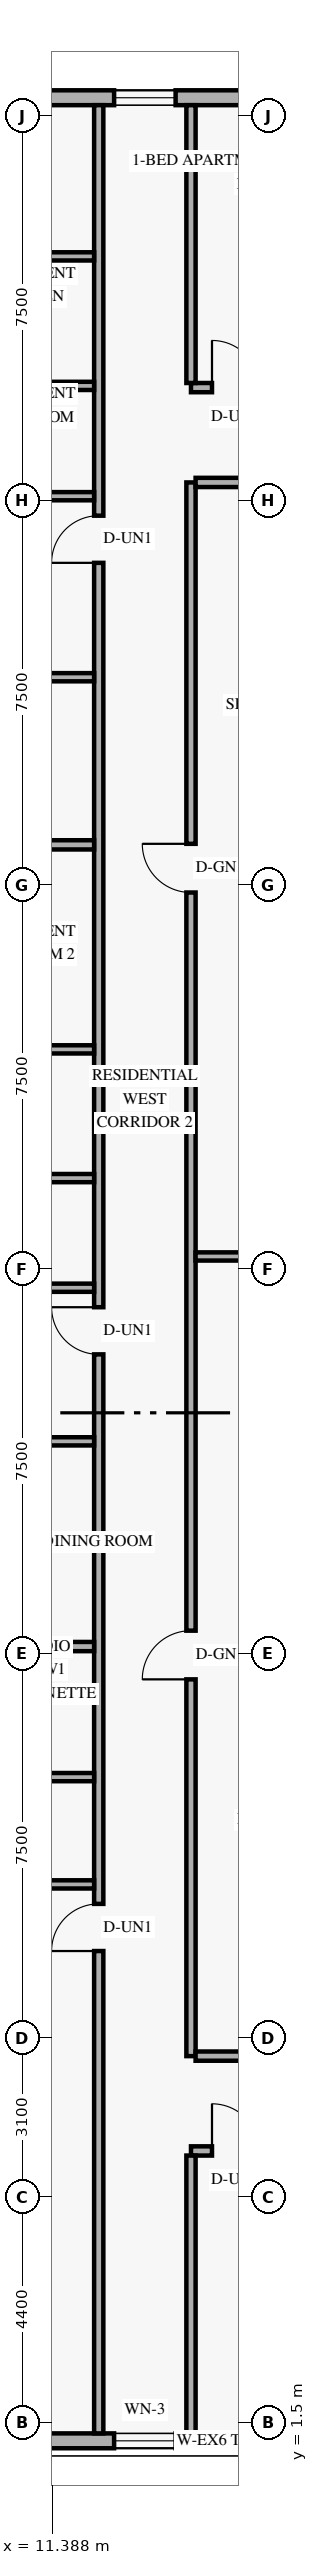
"""IFC4 building model, lengths in metres.
Left out: names, types, materials, properties, quantities, classifications, styles, units other than length and angle.
Written with IfcOpenShell. Run it as: python <this file> out.ifc"""

import sys

from ifc_helpers import new_model, si_unit, direction, frame, frame_2d, origin, place, context, subcontext, project, spatial, rectangle, extrude, element, fill, save


model = new_model("IFC4")
c1 = context("Model", 3, precision=1e-05, world=origin(), true_north=direction((0.0, 1.0)))
c2 = subcontext(c1, "Body", "Model", "MODEL_VIEW")
j1 = project(units=[si_unit("LENGTHUNIT", "METRE"), si_unit("PLANEANGLEUNIT", "RADIAN")], contexts=[c1])
p1 = place(None, origin())
s1 = spatial("IfcSite", under=j1, at=p1, CompositionType="ELEMENT")
p2 = place(p1, origin())
s2 = spatial("IfcBuilding", under=s1, at=p2, CompositionType="ELEMENT")
p3 = place(p2, frame((0.0, 0.0, 31.2)))
s3 = spatial("IfcBuildingStorey", under=s2, at=p3, CompositionType="ELEMENT", Elevation=31.2)
p4 = place(p3, frame((5.42, 1.145, 0.0), z_axis=(0.0, 0.0, 1.0), x_axis=(1.0, 0.0, 0.0)))
e1 = element("IfcWall", 1, at=p4, inside=s3, PredefinedType="SOLIDWALL", context=c2, shape_type="SweptSolid", body=[
    extrude(rectangle(XDim=19.58, YDim=0.29, at=frame_2d((9.79, 0.0))), origin(), (0.0, 0.0, 1.0), 3.36),
])
p5 = place(p4, frame((2.69, 0.0, 0.85)))
e2 = element("IfcOpeningElement", 2, at=p5, cuts=e1, PredefinedType="OPENING", context=c2, shape_type="SweptSolid", body=[
    extrude(rectangle(XDim=1.5, YDim=1.55, at=frame_2d((0.75, 0.775))), frame((0.0, 0.155, 0.0), z_axis=(0.0, -1.0, 0.0), x_axis=(1.0, 0.0, 0.0)), (0.0, 0.0, 1.0), 0.31),
])
p6 = place(p4, frame((7.18, 0.0, 0.85)))
e3 = element("IfcOpeningElement", 3, at=p6, cuts=e1, PredefinedType="OPENING", context=c2, shape_type="SweptSolid", body=[
    extrude(rectangle(XDim=1.2, YDim=1.5, at=frame_2d((0.6, 0.75))), frame((0.0, 0.155, 0.0), z_axis=(0.0, -1.0, 0.0), x_axis=(1.0, 0.0, 0.0)), (0.0, 0.0, 1.0), 0.31),
])
p7 = place(p4, frame((11.095, 0.0, 0.85)))
e4 = element("IfcOpeningElement", 4, at=p7, cuts=e1, PredefinedType="OPENING", context=c2, shape_type="SweptSolid", body=[
    extrude(rectangle(XDim=1.5, YDim=1.55, at=frame_2d((0.75, 0.775))), frame((0.0, 0.155, 0.0), z_axis=(0.0, -1.0, 0.0), x_axis=(1.0, 0.0, 0.0)), (0.0, 0.0, 1.0), 0.31),
])
p8 = place(p4, frame((16.33, 0.0, 0.85)))
e5 = element("IfcOpeningElement", 5, at=p8, cuts=e1, PredefinedType="OPENING", context=c2, shape_type="SweptSolid", body=[
    extrude(rectangle(XDim=1.5, YDim=1.55, at=frame_2d((0.75, 0.775))), frame((0.0, 0.155, 0.0), z_axis=(0.0, -1.0, 0.0), x_axis=(1.0, 0.0, 0.0)), (0.0, 0.0, 1.0), 0.31),
])
p9 = place(p3, frame((44.98, 46.855, 0.0), z_axis=(0.0, 0.0, 1.0), x_axis=(-1.0, 0.0, 0.0)))
e6 = element("IfcWall", 6, at=p9, inside=s3, PredefinedType="SOLIDWALL", context=c2, shape_type="SweptSolid", body=[
    extrude(rectangle(XDim=39.56, YDim=0.29, at=frame_2d((19.78, 0.0))), origin(), (0.0, 0.0, 1.0), 3.36),
])
p10 = place(p9, frame((35.22, 0.0, 0.85)))
e7 = element("IfcOpeningElement", 7, at=p10, cuts=e6, PredefinedType="OPENING", context=c2, shape_type="SweptSolid", body=[
    extrude(rectangle(XDim=1.8, YDim=1.6, at=frame_2d((0.9, 0.8))), frame((0.0, 0.155, 0.0), z_axis=(0.0, -1.0, 0.0), x_axis=(1.0, 0.0, 0.0)), (0.0, 0.0, 1.0), 0.31),
])
p11 = place(p9, frame((31.18, 0.0, 0.85)))
e8 = element("IfcOpeningElement", 8, at=p11, cuts=e6, PredefinedType="OPENING", context=c2, shape_type="SweptSolid", body=[
    extrude(rectangle(XDim=1.2, YDim=1.5, at=frame_2d((0.6, 0.75))), frame((0.0, 0.155, 0.0), z_axis=(0.0, -1.0, 0.0), x_axis=(1.0, 0.0, 0.0)), (0.0, 0.0, 1.0), 0.31),
])
p12 = place(p9, frame((26.625, 0.0, 0.85)))
e9 = element("IfcOpeningElement", 9, at=p12, cuts=e6, PredefinedType="OPENING", context=c2, shape_type="SweptSolid", body=[
    extrude(rectangle(XDim=1.8, YDim=1.6, at=frame_2d((0.9, 0.8))), frame((0.0, 0.155, 0.0), z_axis=(0.0, -1.0, 0.0), x_axis=(1.0, 0.0, 0.0)), (0.0, 0.0, 1.0), 0.31),
])
p13 = place(p9, frame((21.2, 0.0, 0.85)))
e10 = element("IfcOpeningElement", 10, at=p13, cuts=e6, PredefinedType="OPENING", context=c2, shape_type="SweptSolid", body=[
    extrude(rectangle(XDim=1.8, YDim=1.6, at=frame_2d((0.9, 0.8))), frame((0.0, 0.155, 0.0), z_axis=(0.0, -1.0, 0.0), x_axis=(1.0, 0.0, 0.0)), (0.0, 0.0, 1.0), 0.31),
])
p14 = place(p9, frame((15.965, 0.0, 0.85)))
e11 = element("IfcOpeningElement", 11, at=p14, cuts=e6, PredefinedType="OPENING", context=c2, shape_type="SweptSolid", body=[
    extrude(rectangle(XDim=1.8, YDim=1.6, at=frame_2d((0.9, 0.8))), frame((0.0, 0.155, 0.0), z_axis=(0.0, -1.0, 0.0), x_axis=(1.0, 0.0, 0.0)), (0.0, 0.0, 1.0), 0.31),
])
p15 = place(p9, frame((10.73, 0.0, 0.85)))
e12 = element("IfcOpeningElement", 12, at=p15, cuts=e6, PredefinedType="OPENING", context=c2, shape_type="SweptSolid", body=[
    extrude(rectangle(XDim=1.8, YDim=1.6, at=frame_2d((0.9, 0.8))), frame((0.0, 0.155, 0.0), z_axis=(0.0, -1.0, 0.0), x_axis=(1.0, 0.0, 0.0)), (0.0, 0.0, 1.0), 0.31),
])
p16 = place(p9, frame((7.895, 0.0, 0.85)))
e13 = element("IfcOpeningElement", 13, at=p16, cuts=e6, PredefinedType="OPENING", context=c2, shape_type="SweptSolid", body=[
    extrude(rectangle(XDim=1.2, YDim=1.5, at=frame_2d((0.6, 0.75))), frame((0.0, 0.155, 0.0), z_axis=(0.0, -1.0, 0.0), x_axis=(1.0, 0.0, 0.0)), (0.0, 0.0, 1.0), 0.31),
])
p17 = place(p9, frame((2.815, 0.0, 0.85)))
e14 = element("IfcOpeningElement", 14, at=p17, cuts=e6, PredefinedType="OPENING", context=c2, shape_type="SweptSolid", body=[
    extrude(rectangle(XDim=1.8, YDim=1.6, at=frame_2d((0.9, 0.8))), frame((0.0, 0.155, 0.0), z_axis=(0.0, -1.0, 0.0), x_axis=(1.0, 0.0, 0.0)), (0.0, 0.0, 1.0), 0.31),
])
p18 = place(p3, frame((14.1, 6.8, 0.0), z_axis=(0.0, 0.0, 1.0), x_axis=(1.0, 0.0, 0.0)))
e15 = element("IfcWall", 15, at=p18, inside=s3, PredefinedType="STANDARD", context=c2, shape_type="SweptSolid", body=[
    extrude(rectangle(XDim=21.32, YDim=0.18, at=frame_2d((10.66, 0.0))), origin(), (0.0, 0.0, 1.0), 2.649),
])
p19 = place(p18, frame((0.41, 0.0, 0.0)))
e16 = element("IfcOpeningElement", 16, at=p19, cuts=e15, PredefinedType="OPENING", context=c2, shape_type="SweptSolid", body=[
    extrude(rectangle(XDim=0.92, YDim=2.15, at=frame_2d((0.46, 1.075))), frame((0.0, 0.1, 0.0), z_axis=(0.0, -1.0, 0.0), x_axis=(1.0, 0.0, 0.0)), (0.0, 0.0, 1.0), 0.2),
])
p20 = place(p18, frame((10.88, 0.0, 0.0)))
e17 = element("IfcOpeningElement", 17, at=p20, cuts=e15, PredefinedType="OPENING", context=c2, shape_type="SweptSolid", body=[
    extrude(rectangle(XDim=0.92, YDim=2.15, at=frame_2d((0.46, 1.075))), frame((0.0, 0.1, 0.0), z_axis=(0.0, -1.0, 0.0), x_axis=(1.0, 0.0, 0.0)), (0.0, 0.0, 1.0), 0.2),
])
p21 = place(p3, frame((14.1, 41.2, 0.0), z_axis=(0.0, 0.0, 1.0), x_axis=(1.0, 0.0, 0.0)))
e18 = element("IfcWall", 18, at=p21, inside=s3, PredefinedType="STANDARD", context=c2, shape_type="SweptSolid", body=[
    extrude(rectangle(XDim=21.32, YDim=0.18, at=frame_2d((10.66, 0.0))), origin(), (0.0, 0.0, 1.0), 2.649),
])
p22 = place(p21, frame((0.41, 0.0, 0.0)))
e19 = element("IfcOpeningElement", 19, at=p22, cuts=e18, PredefinedType="OPENING", context=c2, shape_type="SweptSolid", body=[
    extrude(rectangle(XDim=0.92, YDim=2.15, at=frame_2d((0.46, 1.075))), frame((0.0, 0.1, 0.0), z_axis=(0.0, -1.0, 0.0), x_axis=(1.0, 0.0, 0.0)), (0.0, 0.0, 1.0), 0.2),
])
p23 = place(p21, frame((11.26, 0.0, 0.0)))
e20 = element("IfcOpeningElement", 20, at=p23, cuts=e18, PredefinedType="OPENING", context=c2, shape_type="SweptSolid", body=[
    extrude(rectangle(XDim=0.92, YDim=2.15, at=frame_2d((0.46, 1.075))), frame((0.0, 0.1, 0.0), z_axis=(0.0, -1.0, 0.0), x_axis=(1.0, 0.0, 0.0)), (0.0, 0.0, 1.0), 0.2),
])
p24 = place(p3, frame((12.3, 1.29, 0.0), z_axis=(0.0, 0.0, 1.0), x_axis=(0.0, 1.0, 0.0)))
e21 = element("IfcWall", 21, at=p24, inside=s3, PredefinedType="STANDARD", context=c2, shape_type="SweptSolid", body=[
    extrude(rectangle(XDim=45.42, YDim=0.18, at=frame_2d((22.71, 0.0))), origin(), (0.0, 0.0, 1.0), 2.649),
])
p25 = place(p24, frame((9.41, 0.0, 0.0)))
e22 = element("IfcOpeningElement", 22, at=p25, cuts=e21, PredefinedType="OPENING", context=c2, shape_type="SweptSolid", body=[
    extrude(rectangle(XDim=0.92, YDim=2.15, at=frame_2d((0.46, 1.075))), frame((0.0, 0.1, 0.0), z_axis=(0.0, -1.0, 0.0), x_axis=(1.0, 0.0, 0.0)), (0.0, 0.0, 1.0), 0.2),
])
p26 = place(p24, frame((21.05, 0.0, 0.0)))
e23 = element("IfcOpeningElement", 23, at=p26, cuts=e21, PredefinedType="OPENING", context=c2, shape_type="SweptSolid", body=[
    extrude(rectangle(XDim=0.92, YDim=2.15, at=frame_2d((0.46, 1.075))), frame((0.0, 0.1, 0.0), z_axis=(0.0, -1.0, 0.0), x_axis=(1.0, 0.0, 0.0)), (0.0, 0.0, 1.0), 0.2),
])
p27 = place(p24, frame((36.491, 0.0, 0.0)))
e24 = element("IfcOpeningElement", 24, at=p27, cuts=e21, PredefinedType="OPENING", context=c2, shape_type="SweptSolid", body=[
    extrude(rectangle(XDim=0.92, YDim=2.15, at=frame_2d((0.46, 1.075))), frame((0.0, 0.1, 0.0), z_axis=(0.0, -1.0, 0.0), x_axis=(1.0, 0.0, 0.0)), (0.0, 0.0, 1.0), 0.2),
])
p28 = place(p3, frame((14.1, 8.65, 0.0), z_axis=(0.0, 0.0, 1.0), x_axis=(0.0, 1.0, 0.0)))
e25 = element("IfcWall", 25, at=p28, inside=s3, PredefinedType="STANDARD", context=c2, shape_type="SweptSolid", body=[
    extrude(rectangle(XDim=30.7, YDim=0.18, at=frame_2d((15.35, 0.0))), origin(), (0.0, 0.0, 1.0), 2.649),
])
p29 = place(p28, frame((7.35, 0.0, 0.0)))
e26 = element("IfcOpeningElement", 26, at=p29, cuts=e25, PredefinedType="OPENING", context=c2, shape_type="SweptSolid", body=[
    extrude(rectangle(XDim=0.95, YDim=2.15, at=frame_2d((0.475, 1.075))), frame((0.0, 0.1, 0.0), z_axis=(0.0, -1.0, 0.0), x_axis=(1.0, 0.0, 0.0)), (0.0, 0.0, 1.0), 0.2),
])
p30 = place(p28, frame((22.7, 0.0, 0.0)))
e27 = element("IfcOpeningElement", 27, at=p30, cuts=e25, PredefinedType="OPENING", context=c2, shape_type="SweptSolid", body=[
    extrude(rectangle(XDim=0.95, YDim=2.15, at=frame_2d((0.475, 1.075))), frame((0.0, 0.1, 0.0), z_axis=(0.0, -1.0, 0.0), x_axis=(1.0, 0.0, 0.0)), (0.0, 0.0, 1.0), 0.2),
])
for number, where, z_axis, x_axis in (
    (28, (14.19, 8.65, 0.0), (0.0, 0.0, 1.0), (1.0, 0.0, 0.0)),
    (29, (14.19, 39.35, 0.0), (0.0, 0.0, 1.0), (1.0, 0.0, 0.0)),
):
    element("IfcWall", number, at=place(p3, frame(where, z_axis=z_axis, x_axis=x_axis)), inside=s3, PredefinedType="STANDARD", context=c2, shape_type="SweptSolid", body=[
        extrude(rectangle(XDim=7.37, YDim=0.18, at=frame_2d((3.685, 0.0))), origin(), (0.0, 0.0, 1.0), 2.649),
    ])
for number, where, z_axis, x_axis in (
    (30, (14.1, 1.29, 0.0), (0.0, 0.0, 1.0), (0.0, 1.0, 0.0)),
    (31, (14.1, 41.29, 0.0), (0.0, 0.0, 1.0), (0.0, 1.0, 0.0)),
):
    element("IfcWall", number, at=place(p3, frame(where, z_axis=z_axis, x_axis=x_axis)), inside=s3, PredefinedType="PARTITIONING", context=c2, shape_type="SweptSolid", body=[
        extrude(rectangle(XDim=5.42, YDim=0.18, at=frame_2d((2.71, 0.0))), origin(), (0.0, 0.0, 1.0), 2.809),
    ])
p31 = place(p3, frame((9.376, 12.0, 0.0), z_axis=(0.0, 0.0, 1.0), x_axis=(1.0, 0.0, 0.0)))
e32 = element("IfcWall", 32, at=p31, inside=s3, PredefinedType="PLUMBINGWALL", context=c2, shape_type="SweptSolid", body=[
    extrude(rectangle(XDim=2.834, YDim=0.16, at=frame_2d((1.417, 0.0))), origin(), (0.0, 0.0, 1.0), 2.649),
])
p32 = place(p3, frame((9.536, 14.093, 0.0), z_axis=(0.0, 0.0, 1.0), x_axis=(1.0, 0.0, 0.0)))
e33 = element("IfcWall", 33, at=p32, inside=s3, PredefinedType="PLUMBINGWALL", context=c2, shape_type="SweptSolid", body=[
    extrude(rectangle(XDim=2.674, YDim=0.16, at=frame_2d((1.337, 0.0))), origin(), (0.0, 0.0, 1.0), 2.649),
])
p33 = place(p3, frame((2.09, 16.64, 0.0), z_axis=(0.0, 0.0, 1.0), x_axis=(1.0, 0.0, 0.0)))
e34 = element("IfcWall", 34, at=p33, inside=s3, PredefinedType="PARTITIONING", context=c2, shape_type="SweptSolid", body=[
    extrude(rectangle(XDim=10.12, YDim=0.18, at=frame_2d((5.06, 0.0))), origin(), (0.0, 0.0, 1.0), 2.649),
])
p34 = place(p3, frame((2.09, 28.29, 0.0), z_axis=(0.0, 0.0, 1.0), x_axis=(1.0, 0.0, 0.0)))
e35 = element("IfcWall", 35, at=p34, inside=s3, PredefinedType="PARTITIONING", context=c2, shape_type="SweptSolid", body=[
    extrude(rectangle(XDim=10.12, YDim=0.16, at=frame_2d((5.06, 0.0))), origin(), (0.0, 0.0, 1.0), 2.649),
])
p35 = place(p34, frame((2.145, 0.0, 0.0)))
e36 = element("IfcOpeningElement", 36, at=p35, cuts=e35, PredefinedType="OPENING", context=c2, shape_type="SweptSolid", body=[
    extrude(rectangle(XDim=0.88, YDim=2.14, at=frame_2d((0.44, 1.07))), frame((0.0, 0.09, 0.0), z_axis=(0.0, -1.0, 0.0), x_axis=(1.0, 0.0, 0.0)), (0.0, 0.0, 1.0), 0.18),
])
p36 = place(p34, frame((6.035, 0.0, 0.0)))
e37 = element("IfcOpeningElement", 37, at=p36, cuts=e35, PredefinedType="OPENING", context=c2, shape_type="SweptSolid", body=[
    extrude(rectangle(XDim=0.88, YDim=2.14, at=frame_2d((0.44, 1.07))), frame((0.0, 0.09, 0.0), z_axis=(0.0, -1.0, 0.0), x_axis=(1.0, 0.0, 0.0)), (0.0, 0.0, 1.0), 0.18),
])
p37 = place(p3, frame((9.65, 23.64, 0.0), z_axis=(0.0, 0.0, 1.0), x_axis=(1.0, 0.0, 0.0)))
e38 = element("IfcWall", 38, at=p37, inside=s3, PredefinedType="PLUMBINGWALL", context=c2, shape_type="SweptSolid", body=[
    extrude(rectangle(XDim=2.56, YDim=0.16, at=frame_2d((1.28, 0.0))), origin(), (0.0, 0.0, 1.0), 2.649),
])
p38 = place(p3, frame((9.81, 25.779, 0.0), z_axis=(0.0, 0.0, 1.0), x_axis=(1.0, 0.0, 0.0)))
e39 = element("IfcWall", 39, at=p38, inside=s3, PredefinedType="PLUMBINGWALL", context=c2, shape_type="SweptSolid", body=[
    extrude(rectangle(XDim=2.4, YDim=0.16, at=frame_2d((1.2, 0.0))), origin(), (0.0, 0.0, 1.0), 2.649),
])
p39 = place(p3, frame((2.09, 20.643, 0.0), z_axis=(0.0, 0.0, 1.0), x_axis=(1.0, 0.0, 0.0)))
e40 = element("IfcWall", 40, at=p39, inside=s3, PredefinedType="PARTITIONING", context=c2, shape_type="SweptSolid", body=[
    extrude(rectangle(XDim=10.12, YDim=0.16, at=frame_2d((5.06, 0.0))), origin(), (0.0, 0.0, 1.0), 2.649),
])
p40 = place(p39, frame((4.51, 0.0, 0.0)))
e41 = element("IfcOpeningElement", 41, at=p40, cuts=e40, PredefinedType="OPENING", context=c2, shape_type="SweptSolid", body=[
    extrude(rectangle(XDim=0.95, YDim=2.15, at=frame_2d((0.475, 1.075))), frame((0.0, 0.09, 0.0), z_axis=(0.0, -1.0, 0.0), x_axis=(1.0, 0.0, 0.0)), (0.0, 0.0, 1.0), 0.18),
])
p41 = place(p3, frame((2.09, 32.28, 0.0), z_axis=(0.0, 0.0, 1.0), x_axis=(1.0, 0.0, 0.0)))
e42 = element("IfcWall", 42, at=p41, inside=s3, PredefinedType="PARTITIONING", context=c2, shape_type="SweptSolid", body=[
    extrude(rectangle(XDim=10.12, YDim=0.18, at=frame_2d((5.06, 0.0))), origin(), (0.0, 0.0, 1.0), 2.649),
])
p42 = place(p3, frame((2.162, 43.76, 0.0), z_axis=(0.0, 0.0, 1.0), x_axis=(1.0, 0.0, 0.0)))
e43 = element("IfcWall", 43, at=p42, inside=s3, PredefinedType="PARTITIONING", context=c2, shape_type="SweptSolid", body=[
    extrude(rectangle(XDim=10.048, YDim=0.16, at=frame_2d((5.024, 0.0))), origin(), (0.0, 0.0, 1.0), 3.36),
])
p43 = place(p42, frame((2.528, 0.0, 0.0)))
e44 = element("IfcOpeningElement", 44, at=p43, cuts=e43, PredefinedType="OPENING", context=c2, shape_type="SweptSolid", body=[
    extrude(rectangle(XDim=0.9, YDim=2.14, at=frame_2d((0.45, 1.07))), frame((0.0, 0.09, 0.0), z_axis=(0.0, -1.0, 0.0), x_axis=(1.0, 0.0, 0.0)), (0.0, 0.0, 1.0), 0.18),
])
p44 = place(p3, frame((8.43, 39.082, 0.0), z_axis=(0.0, 0.0, 1.0), x_axis=(1.0, 0.0, 0.0)))
e45 = element("IfcWall", 45, at=p44, inside=s3, PredefinedType="PLUMBINGWALL", context=c2, shape_type="SweptSolid", body=[
    extrude(rectangle(XDim=3.78, YDim=0.16, at=frame_2d((1.89, 0.0))), origin(), (0.0, 0.0, 1.0), 3.36),
])
p45 = place(p3, frame((8.59, 41.234, 0.0), z_axis=(0.0, 0.0, 1.0), x_axis=(1.0, 0.0, 0.0)))
e46 = element("IfcWall", 46, at=p45, inside=s3, PredefinedType="PLUMBINGWALL", context=c2, shape_type="SweptSolid", body=[
    extrude(rectangle(XDim=3.62, YDim=0.16, at=frame_2d((1.81, 0.0))), origin(), (0.0, 0.0, 1.0), 2.649),
])
p46 = place(p3, frame((2.09, 35.55, 0.0), z_axis=(0.0, 0.0, 1.0), x_axis=(1.0, 0.0, 0.0)))
e47 = element("IfcWall", 47, at=p46, inside=s3, PredefinedType="PARTITIONING", context=c2, shape_type="SweptSolid", body=[
    extrude(rectangle(XDim=10.12, YDim=0.16, at=frame_2d((5.06, 0.0))), origin(), (0.0, 0.0, 1.0), 2.649),
])
p47 = place(p46, frame((4.51, 0.0, 0.0)))
e48 = element("IfcOpeningElement", 48, at=p47, cuts=e47, PredefinedType="OPENING", context=c2, shape_type="SweptSolid", body=[
    extrude(rectangle(XDim=0.95, YDim=2.15, at=frame_2d((0.475, 1.075))), frame((0.0, 0.09, 0.0), z_axis=(0.0, -1.0, 0.0), x_axis=(1.0, 0.0, 0.0)), (0.0, 0.0, 1.0), 0.18),
])
p48 = place(p3, frame((14.19, 24.25, 0.0), z_axis=(0.0, 0.0, 1.0), x_axis=(1.0, 0.0, 0.0)))
e49 = element("IfcWall", 49, at=p48, inside=s3, PredefinedType="PARTITIONING", context=c2, shape_type="SweptSolid", body=[
    extrude(rectangle(XDim=7.37, YDim=0.16, at=frame_2d((3.685, 0.0))), origin(), (0.0, 0.0, 1.0), 2.649),
])
p49 = place(p6, origin())
e50 = element("IfcWindow", 50, at=p49, inside=s3, PartitioningType="SINGLE_PANEL", PredefinedType="WINDOW", context=c2, shape_type="SweptSolid", body=[
    extrude(rectangle(XDim=1.2, YDim=1.5, at=frame_2d((0.6, 0.75))), frame((0.0, 0.03, 0.0), z_axis=(0.0, -1.0, 0.0), x_axis=(1.0, 0.0, 0.0)), (0.0, 0.0, 1.0), 0.06),
])
fill(e3, e50)
p50 = place(p11, origin())
e51 = element("IfcWindow", 51, at=p50, inside=s3, PartitioningType="SINGLE_PANEL", PredefinedType="WINDOW", context=c2, shape_type="SweptSolid", body=[
    extrude(rectangle(XDim=1.2, YDim=1.5, at=frame_2d((0.6, 0.75))), frame((0.0, 0.03, 0.0), z_axis=(0.0, -1.0, 0.0), x_axis=(1.0, 0.0, 0.0)), (0.0, 0.0, 1.0), 0.06),
])
fill(e8, e51)
p51 = place(p25, origin())
e52 = element("IfcDoor", 52, at=p51, inside=s3, OperationType="SINGLE_SWING_LEFT", PredefinedType="DOOR", context=c2, shape_type="SweptSolid", body=[
    extrude(rectangle(XDim=0.92, YDim=2.15, at=frame_2d((0.46, 1.075))), frame((0.0, 0.025, 0.0), z_axis=(0.0, -1.0, 0.0), x_axis=(1.0, 0.0, 0.0)), (0.0, 0.0, 1.0), 0.05),
])
fill(e22, e52)
p52 = place(p26, origin())
e53 = element("IfcDoor", 53, at=p52, inside=s3, OperationType="SINGLE_SWING_RIGHT", PredefinedType="DOOR", context=c2, shape_type="SweptSolid", body=[
    extrude(rectangle(XDim=0.92, YDim=2.15, at=frame_2d((0.46, 1.075))), frame((0.0, 0.025, 0.0), z_axis=(0.0, -1.0, 0.0), x_axis=(1.0, 0.0, 0.0)), (0.0, 0.0, 1.0), 0.05),
])
fill(e23, e53)
p53 = place(p27, origin())
e54 = element("IfcDoor", 54, at=p53, inside=s3, OperationType="SINGLE_SWING_LEFT", PredefinedType="DOOR", context=c2, shape_type="SweptSolid", body=[
    extrude(rectangle(XDim=0.92, YDim=2.15, at=frame_2d((0.46, 1.075))), frame((0.0, 0.025, 0.0), z_axis=(0.0, -1.0, 0.0), x_axis=(1.0, 0.0, 0.0)), (0.0, 0.0, 1.0), 0.05),
])
fill(e24, e54)
p54 = place(p29, origin())
e55 = element("IfcDoor", 55, at=p54, inside=s3, OperationType="SINGLE_SWING_LEFT", PredefinedType="DOOR", context=c2, shape_type="SweptSolid", body=[
    extrude(rectangle(XDim=0.95, YDim=2.15, at=frame_2d((0.475, 1.075))), frame((0.0, 0.025, 0.0), z_axis=(0.0, -1.0, 0.0), x_axis=(1.0, 0.0, 0.0)), (0.0, 0.0, 1.0), 0.05),
])
fill(e26, e55)
p55 = place(p30, origin())
e56 = element("IfcDoor", 56, at=p55, inside=s3, OperationType="SINGLE_SWING_RIGHT", PredefinedType="DOOR", context=c2, shape_type="SweptSolid", body=[
    extrude(rectangle(XDim=0.95, YDim=2.15, at=frame_2d((0.475, 1.075))), frame((0.0, 0.025, 0.0), z_axis=(0.0, -1.0, 0.0), x_axis=(1.0, 0.0, 0.0)), (0.0, 0.0, 1.0), 0.05),
])
fill(e27, e56)
p56 = place(p19, origin())
e57 = element("IfcDoor", 57, at=p56, inside=s3, OperationType="SINGLE_SWING_LEFT", PredefinedType="DOOR", context=c2, shape_type="SweptSolid", body=[
    extrude(rectangle(XDim=0.92, YDim=2.15, at=frame_2d((0.46, 1.075))), frame((0.0, 0.025, 0.0), z_axis=(0.0, -1.0, 0.0), x_axis=(1.0, 0.0, 0.0)), (0.0, 0.0, 1.0), 0.05),
])
fill(e16, e57)
p57 = place(p22, origin())
e58 = element("IfcDoor", 58, at=p57, inside=s3, OperationType="SINGLE_SWING_LEFT", PredefinedType="DOOR", context=c2, shape_type="SweptSolid", body=[
    extrude(rectangle(XDim=0.92, YDim=2.15, at=frame_2d((0.46, 1.075))), frame((0.0, 0.025, 0.0), z_axis=(0.0, -1.0, 0.0), x_axis=(1.0, 0.0, 0.0)), (0.0, 0.0, 1.0), 0.05),
])
fill(e19, e58)
save(model, sys.argv[1])
